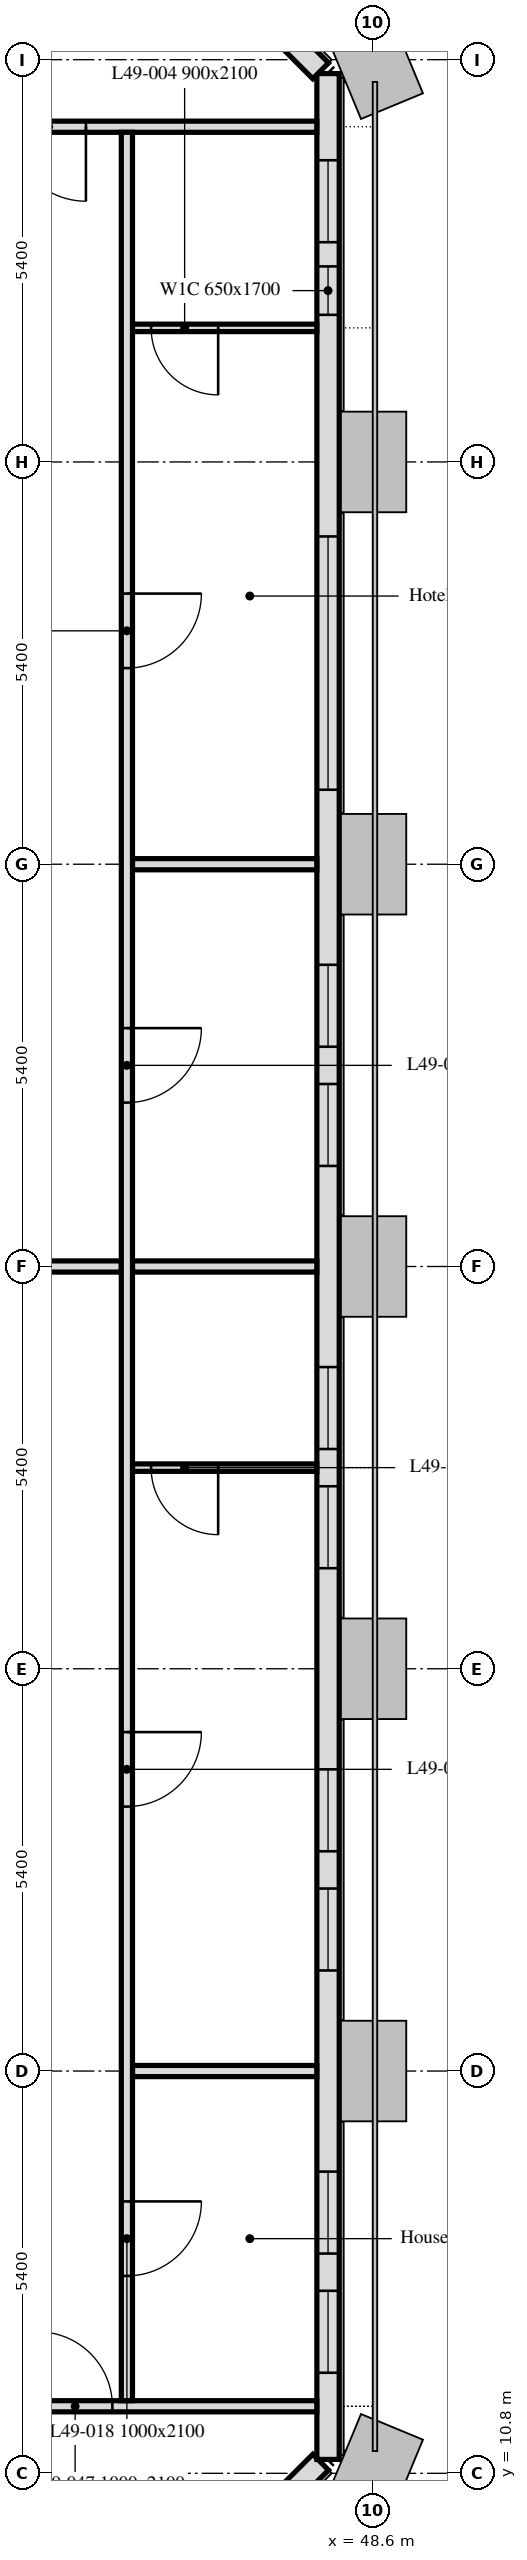
"""IFC4 building model, lengths in metres.
Left out: names, types, materials, properties, quantities, classifications, styles, units other than length and angle.
Written with IfcOpenShell. Run it as: python <this file> out.ifc"""

import sys

from ifc_helpers import new_model, si_unit, direction, frame, frame_2d, origin, place, context, subcontext, project, spatial, rectangle, extrude, element, fill, save


model = new_model("IFC4")
c1 = context("Model", 3, precision=1e-05, world=origin(), true_north=direction((0.0, 1.0)))
c2 = subcontext(c1, "Body", "Model", "MODEL_VIEW")
j1 = project(units=[si_unit("LENGTHUNIT", "METRE"), si_unit("PLANEANGLEUNIT", "RADIAN")], contexts=[c1])
p1 = place(None, origin())
s1 = spatial("IfcSite", under=j1, at=p1, CompositionType="ELEMENT")
p2 = place(p1, origin())
s2 = spatial("IfcBuilding", under=s1, at=p2, CompositionType="ELEMENT")
p3 = place(p2, frame((0.0, 0.0, 200.5)))
s3 = spatial("IfcBuildingStorey", under=s2, at=p3, CompositionType="ELEMENT", Elevation=200.5)
p4 = place(p3, frame((43.051, 6.099, 0.0), z_axis=(0.0, 0.0, 1.0), x_axis=(0.707106781187, 0.707106781187, 0.0)))
e1 = element("IfcWall", 1, at=p4, inside=s3, PredefinedType="SOLIDWALL", context=c2, shape_type="SweptSolid", body=[
    extrude(rectangle(XDim=6.86, YDim=0.3, at=frame_2d((3.43, 0.0))), origin(), (0.0, 0.0, 1.0), 3.0),
])
p5 = place(p4, frame((1.73, 0.0, 0.9)))
e2 = element("IfcOpeningElement", 2, at=p5, cuts=e1, PredefinedType="OPENING", context=c2, shape_type="SweptSolid", body=[
    extrude(rectangle(XDim=3.4, YDim=1.7, at=frame_2d((1.7, 0.85))), frame((0.0, 0.16, 0.0), z_axis=(0.0, -1.0, 0.0), x_axis=(1.0, 0.0, 0.0)), (0.0, 0.0, 1.0), 0.32),
])
p6 = place(p3, frame((48.0, 10.986, 0.0), z_axis=(0.0, 0.0, 1.0), x_axis=(0.0, 1.0, 0.0)))
e3 = element("IfcWall", 3, at=p6, inside=s3, PredefinedType="SOLIDWALL", context=c2, shape_type="SweptSolid", body=[
    extrude(rectangle(XDim=32.027, YDim=0.3, at=frame_2d((16.014, 0.0))), origin(), (0.0, 0.0, 1.0), 3.0),
])
p7 = place(p6, frame((1.164, 0.0, 0.9)))
e4 = element("IfcOpeningElement", 4, at=p7, cuts=e3, PredefinedType="OPENING", context=c2, shape_type="SweptSolid", body=[
    extrude(rectangle(XDim=1.1, YDim=1.7, at=frame_2d((0.55, 0.85))), frame((0.0, 0.16, 0.0), z_axis=(0.0, -1.0, 0.0), x_axis=(1.0, 0.0, 0.0)), (0.0, 0.0, 1.0), 0.32),
])
p8 = place(p6, frame((2.764, 0.0, 0.9)))
e5 = element("IfcOpeningElement", 5, at=p8, cuts=e3, PredefinedType="OPENING", context=c2, shape_type="SweptSolid", body=[
    extrude(rectangle(XDim=1.1, YDim=1.7, at=frame_2d((0.55, 0.85))), frame((0.0, 0.16, 0.0), z_axis=(0.0, -1.0, 0.0), x_axis=(1.0, 0.0, 0.0)), (0.0, 0.0, 1.0), 0.32),
])
p9 = place(p6, frame((6.564, 0.0, 0.9)))
e6 = element("IfcOpeningElement", 6, at=p9, cuts=e3, PredefinedType="OPENING", context=c2, shape_type="SweptSolid", body=[
    extrude(rectangle(XDim=1.1, YDim=1.7, at=frame_2d((0.55, 0.85))), frame((0.0, 0.16, 0.0), z_axis=(0.0, -1.0, 0.0), x_axis=(1.0, 0.0, 0.0)), (0.0, 0.0, 1.0), 0.32),
])
p10 = place(p6, frame((8.164, 0.0, 0.9)))
e7 = element("IfcOpeningElement", 7, at=p10, cuts=e3, PredefinedType="OPENING", context=c2, shape_type="SweptSolid", body=[
    extrude(rectangle(XDim=1.1, YDim=1.7, at=frame_2d((0.55, 0.85))), frame((0.0, 0.16, 0.0), z_axis=(0.0, -1.0, 0.0), x_axis=(1.0, 0.0, 0.0)), (0.0, 0.0, 1.0), 0.32),
])
p11 = place(p6, frame((11.964, 0.0, 0.9)))
e8 = element("IfcOpeningElement", 8, at=p11, cuts=e3, PredefinedType="OPENING", context=c2, shape_type="SweptSolid", body=[
    extrude(rectangle(XDim=1.1, YDim=1.7, at=frame_2d((0.55, 0.85))), frame((0.0, 0.16, 0.0), z_axis=(0.0, -1.0, 0.0), x_axis=(1.0, 0.0, 0.0)), (0.0, 0.0, 1.0), 0.32),
])
p12 = place(p6, frame((13.564, 0.0, 0.9)))
e9 = element("IfcOpeningElement", 9, at=p12, cuts=e3, PredefinedType="OPENING", context=c2, shape_type="SweptSolid", body=[
    extrude(rectangle(XDim=1.1, YDim=1.7, at=frame_2d((0.55, 0.85))), frame((0.0, 0.16, 0.0), z_axis=(0.0, -1.0, 0.0), x_axis=(1.0, 0.0, 0.0)), (0.0, 0.0, 1.0), 0.32),
])
p13 = place(p6, frame((17.364, 0.0, 0.9)))
e10 = element("IfcOpeningElement", 10, at=p13, cuts=e3, PredefinedType="OPENING", context=c2, shape_type="SweptSolid", body=[
    extrude(rectangle(XDim=1.1, YDim=1.7, at=frame_2d((0.55, 0.85))), frame((0.0, 0.16, 0.0), z_axis=(0.0, -1.0, 0.0), x_axis=(1.0, 0.0, 0.0)), (0.0, 0.0, 1.0), 0.32),
])
p14 = place(p6, frame((18.964, 0.0, 0.9)))
e11 = element("IfcOpeningElement", 11, at=p14, cuts=e3, PredefinedType="OPENING", context=c2, shape_type="SweptSolid", body=[
    extrude(rectangle(XDim=1.1, YDim=1.7, at=frame_2d((0.55, 0.85))), frame((0.0, 0.16, 0.0), z_axis=(0.0, -1.0, 0.0), x_axis=(1.0, 0.0, 0.0)), (0.0, 0.0, 1.0), 0.32),
])
p15 = place(p6, frame((22.414, 0.0, 0.9)))
e12 = element("IfcOpeningElement", 12, at=p15, cuts=e3, PredefinedType="OPENING", context=c2, shape_type="SweptSolid", body=[
    extrude(rectangle(XDim=3.4, YDim=1.7, at=frame_2d((1.7, 0.85))), frame((0.0, 0.16, 0.0), z_axis=(0.0, -1.0, 0.0), x_axis=(1.0, 0.0, 0.0)), (0.0, 0.0, 1.0), 0.32),
])
p16 = place(p6, frame((28.789, 0.0, 0.9)))
e13 = element("IfcOpeningElement", 13, at=p16, cuts=e3, PredefinedType="OPENING", context=c2, shape_type="SweptSolid", body=[
    extrude(rectangle(XDim=0.65, YDim=1.7, at=frame_2d((0.325, 0.85))), frame((0.0, 0.16, 0.0), z_axis=(0.0, -1.0, 0.0), x_axis=(1.0, 0.0, 0.0)), (0.0, 0.0, 1.0), 0.32),
])
p17 = place(p6, frame((29.764, 0.0, 0.9)))
e14 = element("IfcOpeningElement", 14, at=p17, cuts=e3, PredefinedType="OPENING", context=c2, shape_type="SweptSolid", body=[
    extrude(rectangle(XDim=1.1, YDim=1.7, at=frame_2d((0.55, 0.85))), frame((0.0, 0.16, 0.0), z_axis=(0.0, -1.0, 0.0), x_axis=(1.0, 0.0, 0.0)), (0.0, 0.0, 1.0), 0.32),
])
p18 = place(p3, frame((47.901, 43.051, 0.0), z_axis=(0.0, 0.0, 1.0), x_axis=(-0.707106781187, 0.707106781187, 0.0)))
e15 = element("IfcWall", 15, at=p18, inside=s3, PredefinedType="SOLIDWALL", context=c2, shape_type="SweptSolid", body=[
    extrude(rectangle(XDim=6.86, YDim=0.3, at=frame_2d((3.43, 0.0))), origin(), (0.0, 0.0, 1.0), 3.0),
])
p19 = place(p18, frame((1.73, 0.0, 0.9)))
e16 = element("IfcOpeningElement", 16, at=p19, cuts=e15, PredefinedType="OPENING", context=c2, shape_type="SweptSolid", body=[
    extrude(rectangle(XDim=3.4, YDim=1.7, at=frame_2d((1.7, 0.85))), frame((0.0, 0.16, 0.0), z_axis=(0.0, -1.0, 0.0), x_axis=(1.0, 0.0, 0.0)), (0.0, 0.0, 1.0), 0.32),
])
p20 = place(p3, frame((45.375, 32.4, 0.0), z_axis=(0.0, 0.0, 1.0), x_axis=(1.0, 0.0, 0.0)))
e17 = element("IfcWall", 17, at=p20, inside=s3, PredefinedType="PARTITIONING", context=c2, shape_type="SweptSolid", body=[
    extrude(rectangle(XDim=2.474, YDim=0.15, at=frame_2d((1.237, 0.0))), origin(), (0.0, 0.0, 1.0), 2.4),
])
p21 = place(p3, frame((47.849, 39.6, 0.0), z_axis=(0.0, 0.0, 1.0), x_axis=(-1.0, 0.0, 0.0)))
e18 = element("IfcWall", 18, at=p21, inside=s3, PredefinedType="PARTITIONING", context=c2, shape_type="SweptSolid", body=[
    extrude(rectangle(XDim=2.474, YDim=0.1, at=frame_2d((1.237, 0.0))), origin(), (0.0, 0.0, 1.0), 3.0),
])
p22 = place(p21, frame((1.324, 0.0, 0.0)))
e19 = element("IfcOpeningElement", 19, at=p22, cuts=e18, PredefinedType="OPENING", context=c2, shape_type="SweptSolid", body=[
    extrude(rectangle(XDim=0.9, YDim=2.1, at=frame_2d((0.45, 1.05))), frame((0.0, 0.05, 0.0), z_axis=(0.0, -1.0, 0.0), x_axis=(1.0, 0.0, 0.0)), (0.0, 0.0, 1.0), 0.1),
])
p23 = place(p3, frame((47.849, 42.3, 0.0), z_axis=(0.0, 0.0, 1.0), x_axis=(-1.0, 0.0, 0.0)))
e20 = element("IfcWall", 20, at=p23, inside=s3, PredefinedType="PARTITIONING", context=c2, shape_type="SweptSolid", body=[
    extrude(rectangle(XDim=41.698, YDim=0.15, at=frame_2d((20.849, 0.0))), origin(), (0.0, 0.0, 1.0), 2.4),
])
p24 = place(p23, frame((39.566, 0.0, 0.0)))
e21 = element("IfcOpeningElement", 21, at=p24, cuts=e20, PredefinedType="OPENING", context=c2, shape_type="SweptSolid", body=[
    extrude(rectangle(XDim=1.0, YDim=2.1, at=frame_2d((0.5, 1.05))), frame((0.0, 0.075, 0.0), z_axis=(0.0, -1.0, 0.0), x_axis=(1.0, 0.0, 0.0)), (0.0, 0.0, 1.0), 0.15),
])
p25 = place(p23, frame((3.099, 0.0, 0.0)))
e22 = element("IfcOpeningElement", 22, at=p25, cuts=e20, PredefinedType="OPENING", context=c2, shape_type="SweptSolid", body=[
    extrude(rectangle(XDim=1.0, YDim=2.1, at=frame_2d((0.5, 1.05))), frame((0.0, 0.075, 0.0), z_axis=(0.0, -1.0, 0.0), x_axis=(1.0, 0.0, 0.0)), (0.0, 0.0, 1.0), 0.15),
])
p26 = place(p23, frame((28.249, 0.0, 0.0)))
e23 = element("IfcOpeningElement", 23, at=p26, cuts=e20, PredefinedType="OPENING", context=c2, shape_type="SweptSolid", body=[
    extrude(rectangle(XDim=1.0, YDim=2.1, at=frame_2d((0.5, 1.05))), frame((0.0, 0.075, 0.0), z_axis=(0.0, -1.0, 0.0), x_axis=(1.0, 0.0, 0.0)), (0.0, 0.0, 1.0), 0.15),
])
p27 = place(p23, frame((17.449, 0.0, 0.0)))
e24 = element("IfcOpeningElement", 24, at=p27, cuts=e20, PredefinedType="OPENING", context=c2, shape_type="SweptSolid", body=[
    extrude(rectangle(XDim=1.0, YDim=2.1, at=frame_2d((0.5, 1.05))), frame((0.0, 0.075, 0.0), z_axis=(0.0, -1.0, 0.0), x_axis=(1.0, 0.0, 0.0)), (0.0, 0.0, 1.0), 0.15),
])
p28 = place(p3, frame((45.375, 27.0, 0.0), z_axis=(0.0, 0.0, 1.0), x_axis=(1.0, 0.0, 0.0)))
e25 = element("IfcWall", 25, at=p28, inside=s3, PredefinedType="PARTITIONING", context=c2, shape_type="SweptSolid", body=[
    extrude(rectangle(XDim=2.474, YDim=0.15, at=frame_2d((1.237, 0.0))), origin(), (0.0, 0.0, 1.0), 2.4),
])
p29 = place(p3, frame((43.2, 27.0, 0.0), z_axis=(0.0, 0.0, 1.0), x_axis=(1.0, 0.0, 0.0)))
e26 = element("IfcWall", 26, at=p29, inside=s3, PredefinedType="PARTITIONING", context=c2, shape_type="SweptSolid", body=[
    extrude(rectangle(XDim=2.025, YDim=0.15, at=frame_2d((1.013, 0.0))), origin(), (0.0, 0.0, 1.0), 2.4),
])
p30 = place(p3, frame((47.849, 16.2, 0.0), z_axis=(0.0, 0.0, 1.0), x_axis=(-1.0, 0.0, 0.0)))
e27 = element("IfcWall", 27, at=p30, inside=s3, PredefinedType="PARTITIONING", context=c2, shape_type="SweptSolid", body=[
    extrude(rectangle(XDim=2.474, YDim=0.15, at=frame_2d((1.237, 0.0))), origin(), (0.0, 0.0, 1.0), 2.4),
])
p31 = place(p3, frame((6.151, 11.7, 0.0), z_axis=(0.0, 0.0, 1.0), x_axis=(1.0, 0.0, 0.0)))
e28 = element("IfcWall", 28, at=p31, inside=s3, PredefinedType="PARTITIONING", context=c2, shape_type="SweptSolid", body=[
    extrude(rectangle(XDim=41.698, YDim=0.15, at=frame_2d((20.849, 0.0))), origin(), (0.0, 0.0, 1.0), 3.0),
])
p32 = place(p31, frame((37.954, 0.0, 0.0)))
e29 = element("IfcOpeningElement", 29, at=p32, cuts=e28, PredefinedType="OPENING", context=c2, shape_type="SweptSolid", body=[
    extrude(rectangle(XDim=1.0, YDim=2.1, at=frame_2d((0.5, 1.05))), frame((0.0, 0.075, 0.0), z_axis=(0.0, -1.0, 0.0), x_axis=(1.0, 0.0, 0.0)), (0.0, 0.0, 1.0), 0.15),
])
p33 = place(p31, frame((6.849, 0.0, 0.0)))
e30 = element("IfcOpeningElement", 30, at=p33, cuts=e28, PredefinedType="OPENING", context=c2, shape_type="SweptSolid", body=[
    extrude(rectangle(XDim=1.0, YDim=2.1, at=frame_2d((0.5, 1.05))), frame((0.0, 0.075, 0.0), z_axis=(0.0, -1.0, 0.0), x_axis=(1.0, 0.0, 0.0)), (0.0, 0.0, 1.0), 0.15),
])
p34 = place(p31, frame((23.049, 0.0, 0.0)))
e31 = element("IfcOpeningElement", 31, at=p34, cuts=e28, PredefinedType="OPENING", context=c2, shape_type="SweptSolid", body=[
    extrude(rectangle(XDim=1.0, YDim=2.1, at=frame_2d((0.5, 1.05))), frame((0.0, 0.075, 0.0), z_axis=(0.0, -1.0, 0.0), x_axis=(1.0, 0.0, 0.0)), (0.0, 0.0, 1.0), 0.15),
])
p35 = place(p3, frame((47.849, 24.3, 0.0), z_axis=(0.0, 0.0, 1.0), x_axis=(-1.0, 0.0, 0.0)))
e32 = element("IfcWall", 32, at=p35, inside=s3, PredefinedType="PARTITIONING", context=c2, shape_type="SweptSolid", body=[
    extrude(rectangle(XDim=2.474, YDim=0.1, at=frame_2d((1.237, 0.0))), origin(), (0.0, 0.0, 1.0), 3.0),
])
p36 = place(p35, frame((1.324, 0.0, 0.0)))
e33 = element("IfcOpeningElement", 33, at=p36, cuts=e32, PredefinedType="OPENING", context=c2, shape_type="SweptSolid", body=[
    extrude(rectangle(XDim=0.9, YDim=2.1, at=frame_2d((0.45, 1.05))), frame((0.0, 0.05, 0.0), z_axis=(0.0, -1.0, 0.0), x_axis=(1.0, 0.0, 0.0)), (0.0, 0.0, 1.0), 0.1),
])
p37 = place(p3, frame((45.3, 42.225, 0.0), z_axis=(0.0, 0.0, 1.0), x_axis=(0.0, -1.0, 0.0)))
e34 = element("IfcWall", 34, at=p37, inside=s3, PredefinedType="PARTITIONING", context=c2, shape_type="SweptSolid", body=[
    extrude(rectangle(XDim=30.45, YDim=0.15, at=frame_2d((15.225, 0.0))), origin(), (0.0, 0.0, 1.0), 2.4),
])
p38 = place(p37, frame((12.025, 0.0, 0.0)))
e35 = element("IfcOpeningElement", 35, at=p38, cuts=e34, PredefinedType="OPENING", context=c2, shape_type="SweptSolid", body=[
    extrude(rectangle(XDim=1.0, YDim=2.1, at=frame_2d((0.5, 1.05))), frame((0.0, 0.075, 0.0), z_axis=(0.0, -1.0, 0.0), x_axis=(1.0, 0.0, 0.0)), (0.0, 0.0, 1.0), 0.15),
])
p39 = place(p37, frame((27.775, 0.0, 0.0)))
e36 = element("IfcOpeningElement", 36, at=p39, cuts=e34, PredefinedType="OPENING", context=c2, shape_type="SweptSolid", body=[
    extrude(rectangle(XDim=1.0, YDim=2.1, at=frame_2d((0.5, 1.05))), frame((0.0, 0.075, 0.0), z_axis=(0.0, -1.0, 0.0), x_axis=(1.0, 0.0, 0.0)), (0.0, 0.0, 1.0), 0.15),
])
p40 = place(p37, frame((6.192, 0.0, 0.0)))
e37 = element("IfcOpeningElement", 37, at=p40, cuts=e34, PredefinedType="OPENING", context=c2, shape_type="SweptSolid", body=[
    extrude(rectangle(XDim=1.0, YDim=2.1, at=frame_2d((0.5, 1.05))), frame((0.0, 0.075, 0.0), z_axis=(0.0, -1.0, 0.0), x_axis=(1.0, 0.0, 0.0)), (0.0, 0.0, 1.0), 0.15),
])
p41 = place(p37, frame((21.475, 0.0, 0.0)))
e38 = element("IfcOpeningElement", 38, at=p41, cuts=e34, PredefinedType="OPENING", context=c2, shape_type="SweptSolid", body=[
    extrude(rectangle(XDim=1.0, YDim=2.1, at=frame_2d((0.5, 1.05))), frame((0.0, 0.075, 0.0), z_axis=(0.0, -1.0, 0.0), x_axis=(1.0, 0.0, 0.0)), (0.0, 0.0, 1.0), 0.15),
])
p42 = place(p7, origin())
e39 = element("IfcWindow", 39, at=p42, inside=s3, PartitioningType="SINGLE_PANEL", PredefinedType="WINDOW", context=c2, shape_type="SweptSolid", body=[
    extrude(rectangle(XDim=1.1, YDim=1.7, at=frame_2d((0.55, 0.85))), frame((0.0, 0.03, 0.0), z_axis=(0.0, -1.0, 0.0), x_axis=(1.0, 0.0, 0.0)), (0.0, 0.0, 1.0), 0.06),
])
fill(e4, e39)
p43 = place(p8, origin())
e40 = element("IfcWindow", 40, at=p43, inside=s3, PartitioningType="SINGLE_PANEL", PredefinedType="WINDOW", context=c2, shape_type="SweptSolid", body=[
    extrude(rectangle(XDim=1.1, YDim=1.7, at=frame_2d((0.55, 0.85))), frame((0.0, 0.03, 0.0), z_axis=(0.0, -1.0, 0.0), x_axis=(1.0, 0.0, 0.0)), (0.0, 0.0, 1.0), 0.06),
])
fill(e5, e40)
p44 = place(p9, origin())
e41 = element("IfcWindow", 41, at=p44, inside=s3, PartitioningType="SINGLE_PANEL", PredefinedType="WINDOW", context=c2, shape_type="SweptSolid", body=[
    extrude(rectangle(XDim=1.1, YDim=1.7, at=frame_2d((0.55, 0.85))), frame((0.0, 0.03, 0.0), z_axis=(0.0, -1.0, 0.0), x_axis=(1.0, 0.0, 0.0)), (0.0, 0.0, 1.0), 0.06),
])
fill(e6, e41)
p45 = place(p10, origin())
e42 = element("IfcWindow", 42, at=p45, inside=s3, PartitioningType="SINGLE_PANEL", PredefinedType="WINDOW", context=c2, shape_type="SweptSolid", body=[
    extrude(rectangle(XDim=1.1, YDim=1.7, at=frame_2d((0.55, 0.85))), frame((0.0, 0.03, 0.0), z_axis=(0.0, -1.0, 0.0), x_axis=(1.0, 0.0, 0.0)), (0.0, 0.0, 1.0), 0.06),
])
fill(e7, e42)
p46 = place(p11, origin())
e43 = element("IfcWindow", 43, at=p46, inside=s3, PartitioningType="SINGLE_PANEL", PredefinedType="WINDOW", context=c2, shape_type="SweptSolid", body=[
    extrude(rectangle(XDim=1.1, YDim=1.7, at=frame_2d((0.55, 0.85))), frame((0.0, 0.03, 0.0), z_axis=(0.0, -1.0, 0.0), x_axis=(1.0, 0.0, 0.0)), (0.0, 0.0, 1.0), 0.06),
])
fill(e8, e43)
p47 = place(p12, origin())
e44 = element("IfcWindow", 44, at=p47, inside=s3, PartitioningType="SINGLE_PANEL", PredefinedType="WINDOW", context=c2, shape_type="SweptSolid", body=[
    extrude(rectangle(XDim=1.1, YDim=1.7, at=frame_2d((0.55, 0.85))), frame((0.0, 0.03, 0.0), z_axis=(0.0, -1.0, 0.0), x_axis=(1.0, 0.0, 0.0)), (0.0, 0.0, 1.0), 0.06),
])
fill(e9, e44)
p48 = place(p13, origin())
e45 = element("IfcWindow", 45, at=p48, inside=s3, PartitioningType="SINGLE_PANEL", PredefinedType="WINDOW", context=c2, shape_type="SweptSolid", body=[
    extrude(rectangle(XDim=1.1, YDim=1.7, at=frame_2d((0.55, 0.85))), frame((0.0, 0.03, 0.0), z_axis=(0.0, -1.0, 0.0), x_axis=(1.0, 0.0, 0.0)), (0.0, 0.0, 1.0), 0.06),
])
fill(e10, e45)
p49 = place(p14, origin())
e46 = element("IfcWindow", 46, at=p49, inside=s3, PartitioningType="SINGLE_PANEL", PredefinedType="WINDOW", context=c2, shape_type="SweptSolid", body=[
    extrude(rectangle(XDim=1.1, YDim=1.7, at=frame_2d((0.55, 0.85))), frame((0.0, 0.03, 0.0), z_axis=(0.0, -1.0, 0.0), x_axis=(1.0, 0.0, 0.0)), (0.0, 0.0, 1.0), 0.06),
])
fill(e11, e46)
p50 = place(p15, origin())
e47 = element("IfcWindow", 47, at=p50, inside=s3, PartitioningType="SINGLE_PANEL", PredefinedType="WINDOW", context=c2, shape_type="SweptSolid", body=[
    extrude(rectangle(XDim=3.4, YDim=1.7, at=frame_2d((1.7, 0.85))), frame((0.0, 0.03, 0.0), z_axis=(0.0, -1.0, 0.0), x_axis=(1.0, 0.0, 0.0)), (0.0, 0.0, 1.0), 0.06),
])
fill(e12, e47)
p51 = place(p16, origin())
e48 = element("IfcWindow", 48, at=p51, inside=s3, PartitioningType="SINGLE_PANEL", PredefinedType="WINDOW", context=c2, shape_type="SweptSolid", body=[
    extrude(rectangle(XDim=0.65, YDim=1.7, at=frame_2d((0.325, 0.85))), frame((0.0, 0.03, 0.0), z_axis=(0.0, -1.0, 0.0), x_axis=(1.0, 0.0, 0.0)), (0.0, 0.0, 1.0), 0.06),
])
fill(e13, e48)
p52 = place(p17, origin())
e49 = element("IfcWindow", 49, at=p52, inside=s3, PartitioningType="SINGLE_PANEL", PredefinedType="WINDOW", context=c2, shape_type="SweptSolid", body=[
    extrude(rectangle(XDim=1.1, YDim=1.7, at=frame_2d((0.55, 0.85))), frame((0.0, 0.03, 0.0), z_axis=(0.0, -1.0, 0.0), x_axis=(1.0, 0.0, 0.0)), (0.0, 0.0, 1.0), 0.06),
])
fill(e14, e49)
p53 = place(p22, origin())
e50 = element("IfcDoor", 50, at=p53, inside=s3, OperationType="SINGLE_SWING_RIGHT", PredefinedType="DOOR", context=c2, shape_type="SweptSolid", body=[
    extrude(rectangle(XDim=0.9, YDim=2.1, at=frame_2d((0.45, 1.05))), frame((0.0, 0.025, 0.0), z_axis=(0.0, -1.0, 0.0), x_axis=(1.0, 0.0, 0.0)), (0.0, 0.0, 1.0), 0.05),
])
fill(e19, e50)
p54 = place(p38, origin())
e51 = element("IfcDoor", 51, at=p54, inside=s3, OperationType="SINGLE_SWING_RIGHT", PredefinedType="DOOR", context=c2, shape_type="SweptSolid", body=[
    extrude(rectangle(XDim=1.0, YDim=2.1, at=frame_2d((0.5, 1.05))), frame((0.0, 0.025, 0.0), z_axis=(0.0, -1.0, 0.0), x_axis=(1.0, 0.0, 0.0)), (0.0, 0.0, 1.0), 0.05),
])
fill(e35, e51)
p55 = place(p39, origin())
e52 = element("IfcDoor", 52, at=p55, inside=s3, OperationType="SINGLE_SWING_LEFT", PredefinedType="DOOR", context=c2, shape_type="SweptSolid", body=[
    extrude(rectangle(XDim=1.0, YDim=2.1, at=frame_2d((0.5, 1.05))), frame((0.0, 0.025, 0.0), z_axis=(0.0, -1.0, 0.0), x_axis=(1.0, 0.0, 0.0)), (0.0, 0.0, 1.0), 0.05),
])
fill(e36, e52)
p56 = place(p36, origin())
e53 = element("IfcDoor", 53, at=p56, inside=s3, OperationType="SINGLE_SWING_LEFT", PredefinedType="DOOR", context=c2, shape_type="SweptSolid", body=[
    extrude(rectangle(XDim=0.9, YDim=2.1, at=frame_2d((0.45, 1.05))), frame((0.0, 0.025, 0.0), z_axis=(0.0, -1.0, 0.0), x_axis=(1.0, 0.0, 0.0)), (0.0, 0.0, 1.0), 0.05),
])
fill(e33, e53)
p57 = place(p40, origin())
e54 = element("IfcDoor", 54, at=p57, inside=s3, OperationType="SINGLE_SWING_RIGHT", PredefinedType="DOOR", context=c2, shape_type="SweptSolid", body=[
    extrude(rectangle(XDim=1.0, YDim=2.1, at=frame_2d((0.5, 1.05))), frame((0.0, 0.025, 0.0), z_axis=(0.0, -1.0, 0.0), x_axis=(1.0, 0.0, 0.0)), (0.0, 0.0, 1.0), 0.05),
])
fill(e37, e54)
p58 = place(p25, origin())
e55 = element("IfcDoor", 55, at=p58, inside=s3, OperationType="SINGLE_SWING_RIGHT", PredefinedType="DOOR", context=c2, shape_type="SweptSolid", body=[
    extrude(rectangle(XDim=1.0, YDim=2.1, at=frame_2d((0.5, 1.05))), frame((0.0, 0.025, 0.0), z_axis=(0.0, -1.0, 0.0), x_axis=(1.0, 0.0, 0.0)), (0.0, 0.0, 1.0), 0.05),
])
fill(e22, e55)
p59 = place(p32, origin())
e56 = element("IfcDoor", 56, at=p59, inside=s3, OperationType="SINGLE_SWING_LEFT", PredefinedType="DOOR", context=c2, shape_type="SweptSolid", body=[
    extrude(rectangle(XDim=1.0, YDim=2.1, at=frame_2d((0.5, 1.05))), frame((0.0, 0.025, 0.0), z_axis=(0.0, -1.0, 0.0), x_axis=(1.0, 0.0, 0.0)), (0.0, 0.0, 1.0), 0.05),
])
fill(e29, e56)
p60 = place(p41, origin())
e57 = element("IfcDoor", 57, at=p60, inside=s3, OperationType="SINGLE_SWING_RIGHT", PredefinedType="DOOR", context=c2, shape_type="SweptSolid", body=[
    extrude(rectangle(XDim=1.0, YDim=2.1, at=frame_2d((0.5, 1.05))), frame((0.0, 0.025, 0.0), z_axis=(0.0, -1.0, 0.0), x_axis=(1.0, 0.0, 0.0)), (0.0, 0.0, 1.0), 0.05),
])
fill(e38, e57)
save(model, sys.argv[1])
